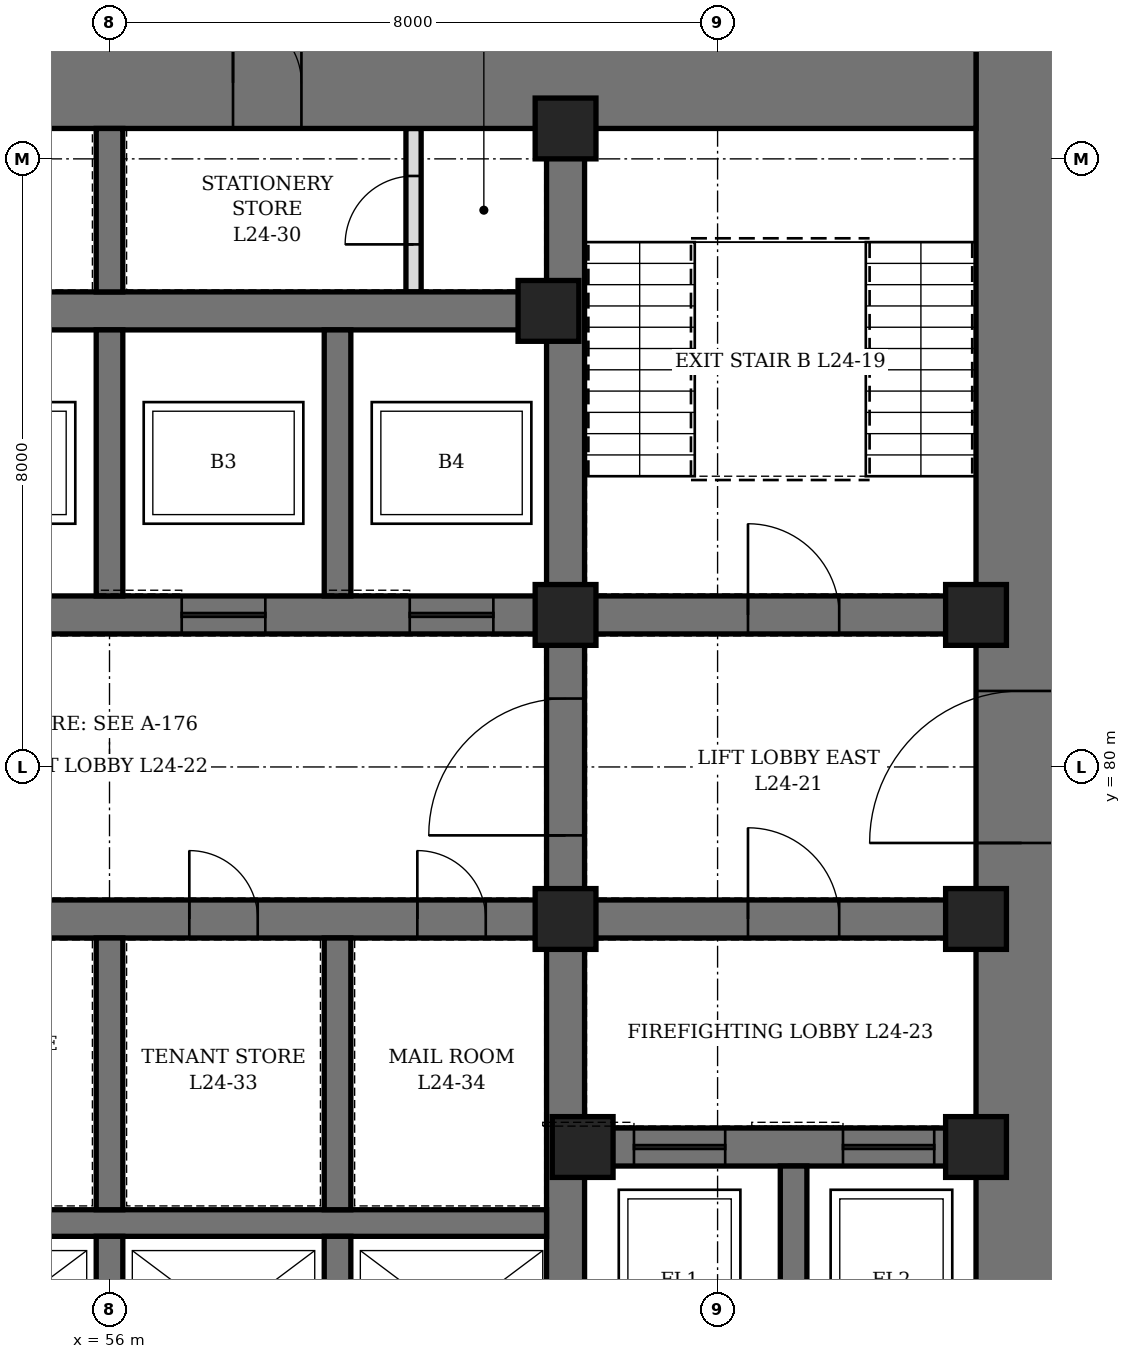
"""IFC4 building model, lengths in metres.
Left out: names, types, materials, properties, quantities, classifications, styles, units other than length and angle.
Written with IfcOpenShell. Run it as: python <this file> out.ifc"""

import sys

from ifc_helpers import new_model, si_unit, direction, frame, frame_2d, origin, origin_2d, place, context, subcontext, project, spatial, rectangle, hollow_rectangle, extrude, element, fill, save


model = new_model("IFC4")
c1 = context("Model", 3, precision=1e-05, world=origin(), true_north=direction((0.0, 1.0)))
c2 = subcontext(c1, "Body", "Model", "MODEL_VIEW")
j1 = project(units=[si_unit("LENGTHUNIT", "METRE"), si_unit("PLANEANGLEUNIT", "RADIAN")], contexts=[c1])
p1 = place(None, origin())
s1 = spatial("IfcSite", under=j1, at=p1, CompositionType="ELEMENT")
p2 = place(p1, origin())
s2 = spatial("IfcBuilding", under=s1, at=p2, CompositionType="ELEMENT")
p3 = place(p2, frame((0.0, 0.0, 112.3)))
s3 = spatial("IfcBuildingStorey", under=s2, at=p3, CompositionType="ELEMENT", Elevation=112.3)
p4 = place(p3, frame((68.0, 70.4, 0.0), z_axis=(0.0, 0.0, 1.0), x_axis=(0.0, 1.0, 0.0)))
e1 = element("IfcWall", 1, at=p4, inside=s3, PredefinedType="SHEAR", context=c2, shape_type="SweptSolid", body=[
    extrude(rectangle(XDim=19.2, YDim=1.2, at=frame_2d((9.6, 0.0))), origin(), (0.0, 0.0, 1.0), 4.2),
])
p5 = place(p4, frame((8.6, 0.0, 0.0)))
e2 = element("IfcOpeningElement", 2, at=p5, cuts=e1, PredefinedType="OPENING", context=c2, shape_type="SweptSolid", body=[
    extrude(rectangle(XDim=2.0, YDim=2.4, at=frame_2d((1.0, 1.2))), frame((0.0, 0.61, 0.0), z_axis=(0.0, -1.0, 0.0), x_axis=(1.0, 0.0, 0.0)), (0.0, 0.0, 1.0), 1.22),
])
p6 = place(p3, frame((44.6, 89.0, 0.0), z_axis=(0.0, 0.0, 1.0), x_axis=(1.0, 0.0, 0.0)))
e3 = element("IfcWall", 3, at=p6, inside=s3, PredefinedType="SHEAR", context=c2, shape_type="SweptSolid", body=[
    extrude(rectangle(XDim=22.8, YDim=1.2, at=frame_2d((11.4, 0.0))), origin(), (0.0, 0.0, 1.0), 4.2),
])
p7 = place(p6, frame((9.25, 0.0, 0.0)))
e4 = element("IfcOpeningElement", 4, at=p7, cuts=e3, PredefinedType="OPENING", context=c2, shape_type="SweptSolid", body=[
    extrude(rectangle(XDim=1.0, YDim=2.1, at=frame_2d((0.5, 1.05))), frame((0.0, 0.61, 0.0), z_axis=(0.0, -1.0, 0.0), x_axis=(1.0, 0.0, 0.0)), (0.0, 0.0, 1.0), 1.22),
])
p8 = place(p6, frame((6.45, 0.0, 0.0)))
e5 = element("IfcOpeningElement", 5, at=p8, cuts=e3, PredefinedType="OPENING", context=c2, shape_type="SweptSolid", body=[
    extrude(rectangle(XDim=0.9, YDim=2.1, at=frame_2d((0.45, 1.05))), frame((0.0, 0.61, 0.0), z_axis=(0.0, -1.0, 0.0), x_axis=(1.0, 0.0, 0.0)), (0.0, 0.0, 1.0), 1.22),
])
p9 = place(p6, frame((13.025, 0.0, 0.0)))
e6 = element("IfcOpeningElement", 6, at=p9, cuts=e3, PredefinedType="OPENING", context=c2, shape_type="SweptSolid", body=[
    extrude(rectangle(XDim=0.9, YDim=2.1, at=frame_2d((0.45, 1.05))), frame((0.0, 0.61, 0.0), z_axis=(0.0, -1.0, 0.0), x_axis=(1.0, 0.0, 0.0)), (0.0, 0.0, 1.0), 1.22),
])
p10 = place(p3, frame((62.0, 71.6, 0.0), z_axis=(0.0, 0.0, 1.0), x_axis=(0.0, 1.0, 0.0)))
e7 = element("IfcWall", 7, at=p10, inside=s3, PredefinedType="SHEAR", context=c2, shape_type="SweptSolid", body=[
    extrude(rectangle(XDim=16.8, YDim=0.5, at=frame_2d((8.4, 0.0))), origin(), (0.0, 0.0, 1.0), 4.2),
])
p11 = place(p10, frame((7.5, 0.0, 0.0)))
e8 = element("IfcOpeningElement", 8, at=p11, cuts=e7, PredefinedType="OPENING", context=c2, shape_type="SweptSolid", body=[
    extrude(rectangle(XDim=1.8, YDim=2.4, at=frame_2d((0.9, 1.2))), frame((0.0, 0.26, 0.0), z_axis=(0.0, -1.0, 0.0), x_axis=(1.0, 0.0, 0.0)), (0.0, 0.0, 1.0), 0.52),
])
p12 = place(p3, frame((62.25, 75.0, 0.0), z_axis=(0.0, 0.0, 1.0), x_axis=(1.0, 0.0, 0.0)))
e9 = element("IfcWall", 9, at=p12, inside=s3, PredefinedType="SHEAR", context=c2, shape_type="SweptSolid", body=[
    extrude(rectangle(XDim=5.15, YDim=0.5, at=frame_2d((2.575, 0.0))), origin(), (0.0, 0.0, 1.0), 4.2),
])
p13 = place(p12, frame((0.65, 0.0, 0.0)))
e10 = element("IfcOpeningElement", 10, at=p13, cuts=e9, PredefinedType="OPENING", context=c2, shape_type="SweptSolid", body=[
    extrude(rectangle(XDim=1.2, YDim=2.2, at=frame_2d((0.6, 1.1))), frame((0.0, 0.26, 0.0), z_axis=(0.0, -1.0, 0.0), x_axis=(1.0, 0.0, 0.0)), (0.0, 0.0, 1.0), 0.52),
])
p14 = place(p12, frame((3.4, 0.0, 0.0)))
e11 = element("IfcOpeningElement", 11, at=p14, cuts=e9, PredefinedType="OPENING", context=c2, shape_type="SweptSolid", body=[
    extrude(rectangle(XDim=1.2, YDim=2.2, at=frame_2d((0.6, 1.1))), frame((0.0, 0.26, 0.0), z_axis=(0.0, -1.0, 0.0), x_axis=(1.0, 0.0, 0.0)), (0.0, 0.0, 1.0), 0.52),
])
p15 = place(p3, frame((62.25, 78.0, 0.0), z_axis=(0.0, 0.0, 1.0), x_axis=(1.0, 0.0, 0.0)))
e12 = element("IfcWall", 12, at=p15, inside=s3, PredefinedType="SHEAR", context=c2, shape_type="SweptSolid", body=[
    extrude(rectangle(XDim=5.15, YDim=0.5, at=frame_2d((2.575, 0.0))), origin(), (0.0, 0.0, 1.0), 4.2),
])
p16 = place(p15, frame((2.15, 0.0, 0.0)))
e13 = element("IfcOpeningElement", 13, at=p16, cuts=e12, PredefinedType="OPENING", context=c2, shape_type="SweptSolid", body=[
    extrude(rectangle(XDim=1.2, YDim=2.1, at=frame_2d((0.6, 1.05))), frame((0.0, 0.26, 0.0), z_axis=(0.0, -1.0, 0.0), x_axis=(1.0, 0.0, 0.0)), (0.0, 0.0, 1.0), 0.52),
])
p17 = place(p3, frame((62.25, 82.0, 0.0), z_axis=(0.0, 0.0, 1.0), x_axis=(1.0, 0.0, 0.0)))
e14 = element("IfcWall", 14, at=p17, inside=s3, PredefinedType="SHEAR", context=c2, shape_type="SweptSolid", body=[
    extrude(rectangle(XDim=5.15, YDim=0.5, at=frame_2d((2.575, 0.0))), origin(), (0.0, 0.0, 1.0), 4.2),
])
p18 = place(p17, frame((2.15, 0.0, 0.0)))
e15 = element("IfcOpeningElement", 15, at=p18, cuts=e14, PredefinedType="OPENING", context=c2, shape_type="SweptSolid", body=[
    extrude(rectangle(XDim=1.2, YDim=2.1, at=frame_2d((0.6, 1.05))), frame((0.0, 0.26, 0.0), z_axis=(0.0, -1.0, 0.0), x_axis=(1.0, 0.0, 0.0)), (0.0, 0.0, 1.0), 0.52),
])
p19 = place(p3, frame((50.25, 78.0, 0.0), z_axis=(0.0, 0.0, 1.0), x_axis=(1.0, 0.0, 0.0)))
e16 = element("IfcWall", 16, at=p19, inside=s3, PredefinedType="SHEAR", context=c2, shape_type="SweptSolid", body=[
    extrude(rectangle(XDim=11.5, YDim=0.5, at=frame_2d((5.75, 0.0))), origin(), (0.0, 0.0, 1.0), 4.2),
])
p20 = place(p19, frame((0.8, 0.0, 0.0)))
e17 = element("IfcOpeningElement", 17, at=p20, cuts=e16, PredefinedType="OPENING", context=c2, shape_type="SweptSolid", body=[
    extrude(rectangle(XDim=0.9, YDim=2.1, at=frame_2d((0.45, 1.05))), frame((0.0, 0.26, 0.0), z_axis=(0.0, -1.0, 0.0), x_axis=(1.0, 0.0, 0.0)), (0.0, 0.0, 1.0), 0.52),
])
p21 = place(p19, frame((3.8, 0.0, 0.0)))
e18 = element("IfcOpeningElement", 18, at=p21, cuts=e16, PredefinedType="OPENING", context=c2, shape_type="SweptSolid", body=[
    extrude(rectangle(XDim=0.9, YDim=2.1, at=frame_2d((0.45, 1.05))), frame((0.0, 0.26, 0.0), z_axis=(0.0, -1.0, 0.0), x_axis=(1.0, 0.0, 0.0)), (0.0, 0.0, 1.0), 0.52),
])
p22 = place(p19, frame((6.8, 0.0, 0.0)))
e19 = element("IfcOpeningElement", 19, at=p22, cuts=e16, PredefinedType="OPENING", context=c2, shape_type="SweptSolid", body=[
    extrude(rectangle(XDim=0.9, YDim=2.1, at=frame_2d((0.45, 1.05))), frame((0.0, 0.26, 0.0), z_axis=(0.0, -1.0, 0.0), x_axis=(1.0, 0.0, 0.0)), (0.0, 0.0, 1.0), 0.52),
])
p23 = place(p19, frame((9.8, 0.0, 0.0)))
e20 = element("IfcOpeningElement", 20, at=p23, cuts=e16, PredefinedType="OPENING", context=c2, shape_type="SweptSolid", body=[
    extrude(rectangle(XDim=0.9, YDim=2.1, at=frame_2d((0.45, 1.05))), frame((0.0, 0.26, 0.0), z_axis=(0.0, -1.0, 0.0), x_axis=(1.0, 0.0, 0.0)), (0.0, 0.0, 1.0), 0.52),
])
p24 = place(p3, frame((50.25, 82.0, 0.0), z_axis=(0.0, 0.0, 1.0), x_axis=(1.0, 0.0, 0.0)))
e21 = element("IfcWall", 21, at=p24, inside=s3, PredefinedType="SHEAR", context=c2, shape_type="SweptSolid", body=[
    extrude(rectangle(XDim=11.5, YDim=0.5, at=frame_2d((5.75, 0.0))), origin(), (0.0, 0.0, 1.0), 4.2),
])
p25 = place(p24, frame((0.7, 0.0, 0.0)))
e22 = element("IfcOpeningElement", 22, at=p25, cuts=e21, PredefinedType="OPENING", context=c2, shape_type="SweptSolid", body=[
    extrude(rectangle(XDim=1.1, YDim=2.2, at=frame_2d((0.55, 1.1))), frame((0.0, 0.26, 0.0), z_axis=(0.0, -1.0, 0.0), x_axis=(1.0, 0.0, 0.0)), (0.0, 0.0, 1.0), 0.52),
])
p26 = place(p24, frame((3.7, 0.0, 0.0)))
e23 = element("IfcOpeningElement", 23, at=p26, cuts=e21, PredefinedType="OPENING", context=c2, shape_type="SweptSolid", body=[
    extrude(rectangle(XDim=1.1, YDim=2.2, at=frame_2d((0.55, 1.1))), frame((0.0, 0.26, 0.0), z_axis=(0.0, -1.0, 0.0), x_axis=(1.0, 0.0, 0.0)), (0.0, 0.0, 1.0), 0.52),
])
p27 = place(p24, frame((6.7, 0.0, 0.0)))
e24 = element("IfcOpeningElement", 24, at=p27, cuts=e21, PredefinedType="OPENING", context=c2, shape_type="SweptSolid", body=[
    extrude(rectangle(XDim=1.1, YDim=2.2, at=frame_2d((0.55, 1.1))), frame((0.0, 0.26, 0.0), z_axis=(0.0, -1.0, 0.0), x_axis=(1.0, 0.0, 0.0)), (0.0, 0.0, 1.0), 0.52),
])
p28 = place(p24, frame((9.7, 0.0, 0.0)))
e25 = element("IfcOpeningElement", 25, at=p28, cuts=e21, PredefinedType="OPENING", context=c2, shape_type="SweptSolid", body=[
    extrude(rectangle(XDim=1.1, YDim=2.2, at=frame_2d((0.55, 1.1))), frame((0.0, 0.26, 0.0), z_axis=(0.0, -1.0, 0.0), x_axis=(1.0, 0.0, 0.0)), (0.0, 0.0, 1.0), 0.52),
])
p29 = place(p3, frame((50.25, 86.0, 0.0), z_axis=(0.0, 0.0, 1.0), x_axis=(1.0, 0.0, 0.0)))
e26 = element("IfcWall", 26, at=p29, inside=s3, PredefinedType="SHEAR", context=c2, shape_type="SweptSolid", body=[
    extrude(rectangle(XDim=11.5, YDim=0.5, at=frame_2d((5.75, 0.0))), origin(), (0.0, 0.0, 1.0), 4.2),
])
p30 = place(p3, frame((50.25, 74.0, 0.0), z_axis=(0.0, 0.0, 1.0), x_axis=(1.0, 0.0, 0.0)))
e27 = element("IfcWall", 27, at=p30, inside=s3, PredefinedType="SHEAR", context=c2, shape_type="SweptSolid", body=[
    extrude(rectangle(XDim=11.5, YDim=0.35, at=frame_2d((5.75, 0.0))), origin(), (0.0, 0.0, 1.0), 4.2),
])
p31 = place(p3, frame((56.0, 71.6, 0.0), z_axis=(0.0, 0.0, 1.0), x_axis=(0.0, 1.0, 0.0)))
e28 = element("IfcWall", 28, at=p31, inside=s3, PredefinedType="SHEAR", context=c2, shape_type="SweptSolid", body=[
    extrude(rectangle(XDim=2.225, YDim=0.35, at=frame_2d((1.112, 0.0))), origin(), (0.0, 0.0, 1.0), 4.2),
])
p32 = place(p3, frame((56.0, 74.175, 0.0), z_axis=(0.0, 0.0, 1.0), x_axis=(0.0, 1.0, 0.0)))
e29 = element("IfcWall", 29, at=p32, inside=s3, PredefinedType="SHEAR", context=c2, shape_type="SweptSolid", body=[
    extrude(rectangle(XDim=3.575, YDim=0.35, at=frame_2d((1.788, 0.0))), origin(), (0.0, 0.0, 1.0), 4.2),
])
p33 = place(p3, frame((56.0, 82.25, 0.0), z_axis=(0.0, 0.0, 1.0), x_axis=(0.0, 1.0, 0.0)))
e30 = element("IfcWall", 30, at=p33, inside=s3, PredefinedType="SHEAR", context=c2, shape_type="SweptSolid", body=[
    extrude(rectangle(XDim=3.5, YDim=0.35, at=frame_2d((1.75, 0.0))), origin(), (0.0, 0.0, 1.0), 4.2),
])
p34 = place(p3, frame((59.0, 71.6, 0.0), z_axis=(0.0, 0.0, 1.0), x_axis=(0.0, 1.0, 0.0)))
e31 = element("IfcWall", 31, at=p34, inside=s3, PredefinedType="SHEAR", context=c2, shape_type="SweptSolid", body=[
    extrude(rectangle(XDim=2.225, YDim=0.35, at=frame_2d((1.112, 0.0))), origin(), (0.0, 0.0, 1.0), 4.2),
])
p35 = place(p3, frame((59.0, 74.175, 0.0), z_axis=(0.0, 0.0, 1.0), x_axis=(0.0, 1.0, 0.0)))
e32 = element("IfcWall", 32, at=p35, inside=s3, PredefinedType="SHEAR", context=c2, shape_type="SweptSolid", body=[
    extrude(rectangle(XDim=3.575, YDim=0.35, at=frame_2d((1.788, 0.0))), origin(), (0.0, 0.0, 1.0), 4.2),
])
p36 = place(p3, frame((59.0, 82.25, 0.0), z_axis=(0.0, 0.0, 1.0), x_axis=(0.0, 1.0, 0.0)))
e33 = element("IfcWall", 33, at=p36, inside=s3, PredefinedType="SHEAR", context=c2, shape_type="SweptSolid", body=[
    extrude(rectangle(XDim=3.5, YDim=0.35, at=frame_2d((1.75, 0.0))), origin(), (0.0, 0.0, 1.0), 4.2),
])
p37 = place(p3, frame((65.0, 71.6, 0.0), z_axis=(0.0, 0.0, 1.0), x_axis=(0.0, 1.0, 0.0)))
e34 = element("IfcWall", 34, at=p37, inside=s3, PredefinedType="SHEAR", context=c2, shape_type="SweptSolid", body=[
    extrude(rectangle(XDim=3.15, YDim=0.35, at=frame_2d((1.575, 0.0))), origin(), (0.0, 0.0, 1.0), 4.2),
])
p38 = place(p3, frame((56.0, 86.25, 0.0), z_axis=(0.0, 0.0, 1.0), x_axis=(0.0, 1.0, 0.0)))
e35 = element("IfcWall", 35, at=p38, inside=s3, PredefinedType="SHEAR", context=c2, shape_type="SweptSolid", body=[
    extrude(rectangle(XDim=2.15, YDim=0.35, at=frame_2d((1.075, 0.0))), origin(), (0.0, 0.0, 1.0), 4.2),
])
for number, where, z_axis, x_axis in (
    (36, (61.775, 86.0, 0.0), (0.0, 0.0, 1.0), (1.0, 0.0, 0.0)),
    (37, (62.0, 78.0, 0.0), (0.0, 0.0, 1.0), (1.0, 0.0, 0.0)),
    (38, (62.0, 82.0, 0.0), (0.0, 0.0, 1.0), (1.0, 0.0, 0.0)),
    (39, (62.0, 88.4, 0.0), (0.0, 0.0, 1.0), (1.0, 0.0, 0.0)),
    (40, (62.225, 75.0, 0.0), (0.0, 0.0, 1.0), (1.0, 0.0, 0.0)),
    (41, (67.4, 75.0, 0.0), (0.0, 0.0, 1.0), (1.0, 0.0, 0.0)),
    (42, (67.4, 78.0, 0.0), (0.0, 0.0, 1.0), (1.0, 0.0, 0.0)),
    (43, (67.4, 82.0, 0.0), (0.0, 0.0, 1.0), (1.0, 0.0, 0.0)),
):
    element("IfcColumn", number, at=place(p3, frame(where, z_axis=z_axis, x_axis=x_axis)), inside=s3, PredefinedType="COLUMN", context=c2, shape_type="SweptSolid", body=[
        extrude(hollow_rectangle(XDim=0.8, YDim=0.8, WallThickness=0.1, at=origin_2d()), origin(), (0.0, 0.0, 1.0), 4.2),
    ])
p39 = place(p3, frame((60.0, 86.25, 0.0), z_axis=(0.0, 0.0, 1.0), x_axis=(0.0, 1.0, 0.0)))
e44 = element("IfcWall", 44, at=p39, inside=s3, PredefinedType="PARTITIONING", context=c2, shape_type="SweptSolid", body=[
    extrude(rectangle(XDim=2.15, YDim=0.2, at=frame_2d((1.075, 0.0))), origin(), (0.0, 0.0, 1.0), 4.04),
])
p40 = place(p39, frame((0.625, 0.0, 0.0)))
e45 = element("IfcOpeningElement", 45, at=p40, cuts=e44, PredefinedType="OPENING", context=c2, shape_type="SweptSolid", body=[
    extrude(rectangle(XDim=0.9, YDim=2.1, at=frame_2d((0.45, 1.05))), frame((0.0, 0.11, 0.0), z_axis=(0.0, -1.0, 0.0), x_axis=(1.0, 0.0, 0.0)), (0.0, 0.0, 1.0), 0.22),
])
p41 = place(p9, origin())
e46 = element("IfcDoor", 46, at=p41, inside=s3, OperationType="SINGLE_SWING_LEFT", PredefinedType="DOOR", context=c2, shape_type="SweptSolid", body=[
    extrude(rectangle(XDim=0.9, YDim=2.1, at=frame_2d((0.45, 1.05))), frame((0.0, 0.35, 0.0), z_axis=(0.0, -1.0, 0.0), x_axis=(1.0, 0.0, 0.0)), (0.0, 0.0, 1.0), 0.7),
])
fill(e6, e46)
p42 = place(p40, origin())
e47 = element("IfcDoor", 47, at=p42, inside=s3, OperationType="SINGLE_SWING_LEFT", PredefinedType="DOOR", context=c2, shape_type="SweptSolid", body=[
    extrude(rectangle(XDim=0.9, YDim=2.1, at=frame_2d((0.45, 1.05))), frame((0.0, 0.1, 0.0), z_axis=(0.0, -1.0, 0.0), x_axis=(1.0, 0.0, 0.0)), (0.0, 0.0, 1.0), 0.199),
])
fill(e45, e47)
p43 = place(p22, origin())
e48 = element("IfcDoor", 48, at=p43, inside=s3, OperationType="SINGLE_SWING_LEFT", PredefinedType="DOOR", context=c2, shape_type="SweptSolid", body=[
    extrude(rectangle(XDim=0.9, YDim=2.1, at=frame_2d((0.45, 1.05))), frame((0.0, 0.25, 0.0), z_axis=(0.0, -1.0, 0.0), x_axis=(1.0, 0.0, 0.0)), (0.0, 0.0, 1.0), 0.5),
])
fill(e19, e48)
p44 = place(p23, origin())
e49 = element("IfcDoor", 49, at=p44, inside=s3, OperationType="SINGLE_SWING_LEFT", PredefinedType="DOOR", context=c2, shape_type="SweptSolid", body=[
    extrude(rectangle(XDim=0.9, YDim=2.1, at=frame_2d((0.45, 1.05))), frame((0.0, 0.25, 0.0), z_axis=(0.0, -1.0, 0.0), x_axis=(1.0, 0.0, 0.0)), (0.0, 0.0, 1.0), 0.5),
])
fill(e20, e49)
p45 = place(p18, origin())
e50 = element("IfcDoor", 50, at=p45, inside=s3, OperationType="SINGLE_SWING_LEFT", PredefinedType="DOOR", context=c2, shape_type="SweptSolid", body=[
    extrude(rectangle(XDim=1.2, YDim=2.1, at=frame_2d((0.6, 1.05))), frame((0.0, 0.25, 0.0), z_axis=(0.0, -1.0, 0.0), x_axis=(1.0, 0.0, 0.0)), (0.0, 0.0, 1.0), 0.5),
])
fill(e15, e50)
p46 = place(p5, origin())
e51 = element("IfcDoor", 51, at=p46, inside=s3, OperationType="DOUBLE_DOOR_SINGLE_SWING", PredefinedType="DOOR", context=c2, shape_type="SweptSolid", body=[
    extrude(rectangle(XDim=2.0, YDim=2.4, at=frame_2d((1.0, 1.2))), frame((0.0, 0.35, 0.0), z_axis=(0.0, -1.0, 0.0), x_axis=(1.0, 0.0, 0.0)), (0.0, 0.0, 1.0), 0.7),
])
fill(e2, e51)
p47 = place(p11, origin())
e52 = element("IfcDoor", 52, at=p47, inside=s3, OperationType="DOUBLE_DOOR_SINGLE_SWING", PredefinedType="DOOR", context=c2, shape_type="SweptSolid", body=[
    extrude(rectangle(XDim=1.8, YDim=2.4, at=frame_2d((0.9, 1.2))), frame((0.0, 0.25, 0.0), z_axis=(0.0, -1.0, 0.0), x_axis=(1.0, 0.0, 0.0)), (0.0, 0.0, 1.0), 0.5),
])
fill(e8, e52)
p48 = place(p16, origin())
e53 = element("IfcDoor", 53, at=p48, inside=s3, OperationType="SINGLE_SWING_RIGHT", PredefinedType="DOOR", context=c2, shape_type="SweptSolid", body=[
    extrude(rectangle(XDim=1.2, YDim=2.1, at=frame_2d((0.6, 1.05))), frame((0.0, 0.25, 0.0), z_axis=(0.0, -1.0, 0.0), x_axis=(1.0, 0.0, 0.0)), (0.0, 0.0, 1.0), 0.5),
])
fill(e13, e53)
p49 = place(p27, origin())
e54 = element("IfcDoor", 54, at=p49, inside=s3, OperationType="SLIDING_TO_LEFT", PredefinedType="DOOR", context=c2, shape_type="SweptSolid", body=[
    extrude(rectangle(XDim=1.1, YDim=2.2, at=frame_2d((0.55, 1.1))), frame((0.0, 0.25, 0.0), z_axis=(0.0, -1.0, 0.0), x_axis=(1.0, 0.0, 0.0)), (0.0, 0.0, 1.0), 0.5),
])
fill(e24, e54)
p50 = place(p28, origin())
e55 = element("IfcDoor", 55, at=p50, inside=s3, OperationType="SLIDING_TO_LEFT", PredefinedType="DOOR", context=c2, shape_type="SweptSolid", body=[
    extrude(rectangle(XDim=1.1, YDim=2.2, at=frame_2d((0.55, 1.1))), frame((0.0, 0.25, 0.0), z_axis=(0.0, -1.0, 0.0), x_axis=(1.0, 0.0, 0.0)), (0.0, 0.0, 1.0), 0.5),
])
fill(e25, e55)
p51 = place(p13, origin())
e56 = element("IfcDoor", 56, at=p51, inside=s3, OperationType="SLIDING_TO_LEFT", PredefinedType="DOOR", context=c2, shape_type="SweptSolid", body=[
    extrude(rectangle(XDim=1.2, YDim=2.2, at=frame_2d((0.6, 1.1))), frame((0.0, 0.25, 0.0), z_axis=(0.0, -1.0, 0.0), x_axis=(1.0, 0.0, 0.0)), (0.0, 0.0, 1.0), 0.5),
])
fill(e10, e56)
p52 = place(p14, origin())
e57 = element("IfcDoor", 57, at=p52, inside=s3, OperationType="SLIDING_TO_LEFT", PredefinedType="DOOR", context=c2, shape_type="SweptSolid", body=[
    extrude(rectangle(XDim=1.2, YDim=2.2, at=frame_2d((0.6, 1.1))), frame((0.0, 0.25, 0.0), z_axis=(0.0, -1.0, 0.0), x_axis=(1.0, 0.0, 0.0)), (0.0, 0.0, 1.0), 0.5),
])
fill(e11, e57)
save(model, sys.argv[1])
